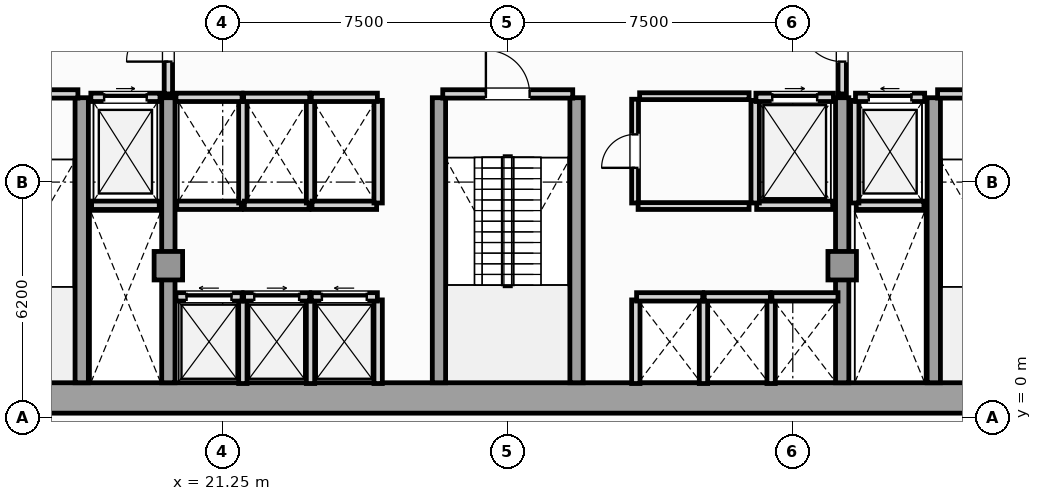
"""IFC4 building model, lengths in metres.
Left out: names, types, materials, properties, quantities, classifications, styles, units other than length and angle.
Written with IfcOpenShell. Run it as: python <this file> out.ifc"""

import sys

from ifc_helpers import new_model, si_unit, direction, frame, frame_2d, origin, origin_2d, place, context, subcontext, project, spatial, rectangle, extrude, element, fill, save


model = new_model("IFC4")
c1 = context("Model", 3, precision=1e-05, world=origin(), true_north=direction((0.0, 1.0)))
c2 = subcontext(c1, "Body", "Model", "MODEL_VIEW")
j1 = project(units=[si_unit("LENGTHUNIT", "METRE"), si_unit("PLANEANGLEUNIT", "RADIAN")], contexts=[c1])
p1 = place(None, origin())
s1 = spatial("IfcSite", under=j1, at=p1, CompositionType="ELEMENT")
p2 = place(p1, origin())
s2 = spatial("IfcBuilding", under=s1, at=p2, CompositionType="ELEMENT")
p3 = place(p2, frame((0.0, 0.0, 19.8)))
s3 = spatial("IfcBuildingStorey", under=s2, at=p3, CompositionType="ELEMENT", Elevation=19.8)
p4 = place(p3, frame((13.25, 0.52, 0.0), z_axis=(0.0, 0.0, 1.0), x_axis=(1.0, 0.0, 0.0)))
e1 = element("IfcWall", 1, at=p4, inside=s3, PredefinedType="SHEAR", context=c2, shape_type="SweptSolid", body=[
    extrude(rectangle(XDim=31.0, YDim=0.8, at=frame_2d((15.5, 0.0))), origin(), (0.0, 0.0, 1.0), 4.4),
])
for number, where, z_axis, x_axis in (
    (2, (17.54, 0.92, 0.0), (0.0, 0.0, 1.0), (0.0, 1.0, 0.0)),
    (3, (19.82, 0.92, 0.0), (0.0, 0.0, 1.0), (0.0, 1.0, 0.0)),
    (4, (26.94, 0.92, 0.0), (0.0, 0.0, 1.0), (0.0, 1.0, 0.0)),
    (5, (30.56, 0.92, 0.0), (0.0, 0.0, 1.0), (0.0, 1.0, 0.0)),
    (6, (37.55, 0.92, 0.0), (0.0, 0.0, 1.0), (0.0, 1.0, 0.0)),
    (7, (39.96, 0.92, 0.0), (0.0, 0.0, 1.0), (0.0, 1.0, 0.0)),
):
    element("IfcWall", number, at=place(p3, frame(where, z_axis=z_axis, x_axis=x_axis)), inside=s3, PredefinedType="SHEAR", context=c2, shape_type="SweptSolid", body=[
        extrude(rectangle(XDim=7.5, YDim=0.35, at=frame_2d((3.75, 0.0))), origin(), (0.0, 0.0, 1.0), 4.4),
    ])
for number, where, z_axis, x_axis in (
    (8, (19.82, 4.0, 0.0), (0.0, 0.0, 1.0), (1.0, 0.0, 0.0)),
    (9, (37.55, 4.0, 0.0), (0.0, 0.0, 1.0), (1.0, 0.0, 0.0)),
):
    element("IfcColumn", number, at=place(p3, frame(where, z_axis=z_axis, x_axis=x_axis)), inside=s3, PredefinedType="COLUMN", context=c2, shape_type="SweptSolid", body=[
        extrude(rectangle(XDim=0.75, YDim=0.75, at=origin_2d()), origin(), (0.0, 0.0, 1.0), 4.8),
    ])
p5 = place(p3, frame((17.8, 5.59, 0.0), z_axis=(0.0, 0.0, 1.0), x_axis=(1.0, 0.0, 0.0)))
e10 = element("IfcWall", 10, at=p5, inside=s3, PredefinedType="SOLIDWALL", context=c2, shape_type="SweptSolid", body=[
    extrude(rectangle(XDim=1.78, YDim=0.22, at=frame_2d((0.89, 0.0))), origin(), (0.0, 0.0, 1.0), 4.4),
])
p6 = place(p3, frame((17.78, 8.43, 0.0), z_axis=(0.0, 0.0, 1.0), x_axis=(1.0, 0.0, 0.0)))
e11 = element("IfcWall", 11, at=p6, inside=s3, PredefinedType="SOLIDWALL", context=c2, shape_type="SweptSolid", body=[
    extrude(rectangle(XDim=1.82, YDim=0.22, at=frame_2d((0.91, 0.0))), origin(), (0.0, 0.0, 1.0), 4.4),
])
p7 = place(p6, frame((0.35, 0.0, 0.0)))
e12 = element("IfcOpeningElement", 12, at=p7, cuts=e11, PredefinedType="OPENING", context=c2, shape_type="SweptSolid", body=[
    extrude(rectangle(XDim=1.12, YDim=2.25, at=frame_2d((0.56, 1.125))), frame((0.0, 0.12, 0.0), z_axis=(0.0, -1.0, 0.0), x_axis=(1.0, 0.0, 0.0)), (0.0, 0.0, 1.0), 0.24),
])
p8 = place(p3, frame((37.92, 5.59, 0.0), z_axis=(0.0, 0.0, 1.0), x_axis=(1.0, 0.0, 0.0)))
e13 = element("IfcWall", 13, at=p8, inside=s3, PredefinedType="SOLIDWALL", context=c2, shape_type="SweptSolid", body=[
    extrude(rectangle(XDim=1.78, YDim=0.22, at=frame_2d((0.89, 0.0))), origin(), (0.0, 0.0, 1.0), 4.4),
])
p9 = place(p3, frame((37.88, 5.65, 0.0), z_axis=(0.0, 0.0, 1.0), x_axis=(0.0, 1.0, 0.0)))
e14 = element("IfcWall", 14, at=p9, inside=s3, PredefinedType="SOLIDWALL", context=c2, shape_type="SweptSolid", body=[
    extrude(rectangle(XDim=2.7, YDim=0.22, at=frame_2d((1.35, 0.0))), origin(), (0.0, 0.0, 1.0), 4.4),
])
p10 = place(p3, frame((37.9, 8.43, 0.0), z_axis=(0.0, 0.0, 1.0), x_axis=(1.0, 0.0, 0.0)))
e15 = element("IfcWall", 15, at=p10, inside=s3, PredefinedType="SOLIDWALL", context=c2, shape_type="SweptSolid", body=[
    extrude(rectangle(XDim=1.82, YDim=0.22, at=frame_2d((0.91, 0.0))), origin(), (0.0, 0.0, 1.0), 4.4),
])
p11 = place(p10, frame((0.35, 0.0, 0.0)))
e16 = element("IfcOpeningElement", 16, at=p11, cuts=e15, PredefinedType="OPENING", context=c2, shape_type="SweptSolid", body=[
    extrude(rectangle(XDim=1.12, YDim=2.25, at=frame_2d((0.56, 1.125))), frame((0.0, 0.12, 0.0), z_axis=(0.0, -1.0, 0.0), x_axis=(1.0, 0.0, 0.0)), (0.0, 0.0, 1.0), 0.24),
])
p12 = place(p3, frame((35.3, 5.59, 0.0), z_axis=(0.0, 0.0, 1.0), x_axis=(1.0, 0.0, 0.0)))
e17 = element("IfcWall", 17, at=p12, inside=s3, PredefinedType="SOLIDWALL", context=c2, shape_type="SweptSolid", body=[
    extrude(rectangle(XDim=2.0, YDim=0.22, at=frame_2d((1.0, 0.0))), origin(), (0.0, 0.0, 1.0), 4.4),
])
p13 = place(p3, frame((35.26, 5.65, 0.0), z_axis=(0.0, 0.0, 1.0), x_axis=(0.0, 1.0, 0.0)))
e18 = element("IfcWall", 18, at=p13, inside=s3, PredefinedType="SOLIDWALL", context=c2, shape_type="SweptSolid", body=[
    extrude(rectangle(XDim=2.7, YDim=0.22, at=frame_2d((1.35, 0.0))), origin(), (0.0, 0.0, 1.0), 4.4),
])
p14 = place(p3, frame((35.28, 8.43, 0.0), z_axis=(0.0, 0.0, 1.0), x_axis=(1.0, 0.0, 0.0)))
e19 = element("IfcWall", 19, at=p14, inside=s3, PredefinedType="SOLIDWALL", context=c2, shape_type="SweptSolid", body=[
    extrude(rectangle(XDim=2.04, YDim=0.22, at=frame_2d((1.02, 0.0))), origin(), (0.0, 0.0, 1.0), 4.4),
])
p15 = place(p14, frame((0.43, 0.0, 0.0)))
e20 = element("IfcOpeningElement", 20, at=p15, cuts=e19, PredefinedType="OPENING", context=c2, shape_type="SweptSolid", body=[
    extrude(rectangle(XDim=1.18, YDim=2.2, at=frame_2d((0.59, 1.1))), frame((0.0, 0.12, 0.0), z_axis=(0.0, -1.0, 0.0), x_axis=(1.0, 0.0, 0.0)), (0.0, 0.0, 1.0), 0.24),
])
p16 = place(p3, frame((21.78, 0.9, 0.0), z_axis=(0.0, 0.0, 1.0), x_axis=(0.0, 1.0, 0.0)))
e21 = element("IfcWall", 21, at=p16, inside=s3, PredefinedType="SOLIDWALL", context=c2, shape_type="SweptSolid", body=[
    extrude(rectangle(XDim=2.2, YDim=0.22, at=frame_2d((1.1, 0.0))), origin(), (0.0, 0.0, 1.0), 4.4),
])
p17 = place(p3, frame((20.02, 3.18, 0.0), z_axis=(0.0, 0.0, 1.0), x_axis=(1.0, 0.0, 0.0)))
e22 = element("IfcWall", 22, at=p17, inside=s3, PredefinedType="SOLIDWALL", context=c2, shape_type="SweptSolid", body=[
    extrude(rectangle(XDim=1.74, YDim=0.22, at=frame_2d((0.87, 0.0))), origin(), (0.0, 0.0, 1.0), 4.4),
])
p18 = place(p17, frame((0.28, 0.0, 0.0)))
e23 = element("IfcOpeningElement", 23, at=p18, cuts=e22, PredefinedType="OPENING", context=c2, shape_type="SweptSolid", body=[
    extrude(rectangle(XDim=1.18, YDim=2.2, at=frame_2d((0.59, 1.1))), frame((0.0, 0.12, 0.0), z_axis=(0.0, -1.0, 0.0), x_axis=(1.0, 0.0, 0.0)), (0.0, 0.0, 1.0), 0.24),
])
p19 = place(p3, frame((23.56, 0.9, 0.0), z_axis=(0.0, 0.0, 1.0), x_axis=(0.0, 1.0, 0.0)))
e24 = element("IfcWall", 24, at=p19, inside=s3, PredefinedType="SOLIDWALL", context=c2, shape_type="SweptSolid", body=[
    extrude(rectangle(XDim=2.2, YDim=0.22, at=frame_2d((1.1, 0.0))), origin(), (0.0, 0.0, 1.0), 4.4),
])
p20 = place(p3, frame((21.8, 3.18, 0.0), z_axis=(0.0, 0.0, 1.0), x_axis=(1.0, 0.0, 0.0)))
e25 = element("IfcWall", 25, at=p20, inside=s3, PredefinedType="SOLIDWALL", context=c2, shape_type="SweptSolid", body=[
    extrude(rectangle(XDim=1.74, YDim=0.22, at=frame_2d((0.87, 0.0))), origin(), (0.0, 0.0, 1.0), 4.4),
])
p21 = place(p20, frame((0.28, 0.0, 0.0)))
e26 = element("IfcOpeningElement", 26, at=p21, cuts=e25, PredefinedType="OPENING", context=c2, shape_type="SweptSolid", body=[
    extrude(rectangle(XDim=1.18, YDim=2.2, at=frame_2d((0.59, 1.1))), frame((0.0, 0.12, 0.0), z_axis=(0.0, -1.0, 0.0), x_axis=(1.0, 0.0, 0.0)), (0.0, 0.0, 1.0), 0.24),
])
p22 = place(p3, frame((25.34, 0.9, 0.0), z_axis=(0.0, 0.0, 1.0), x_axis=(0.0, 1.0, 0.0)))
e27 = element("IfcWall", 27, at=p22, inside=s3, PredefinedType="SOLIDWALL", context=c2, shape_type="SweptSolid", body=[
    extrude(rectangle(XDim=2.2, YDim=0.22, at=frame_2d((1.1, 0.0))), origin(), (0.0, 0.0, 1.0), 4.4),
])
p23 = place(p3, frame((23.58, 3.18, 0.0), z_axis=(0.0, 0.0, 1.0), x_axis=(1.0, 0.0, 0.0)))
e28 = element("IfcWall", 28, at=p23, inside=s3, PredefinedType="SOLIDWALL", context=c2, shape_type="SweptSolid", body=[
    extrude(rectangle(XDim=1.74, YDim=0.22, at=frame_2d((0.87, 0.0))), origin(), (0.0, 0.0, 1.0), 4.4),
])
p24 = place(p23, frame((0.28, 0.0, 0.0)))
e29 = element("IfcOpeningElement", 29, at=p24, cuts=e28, PredefinedType="OPENING", context=c2, shape_type="SweptSolid", body=[
    extrude(rectangle(XDim=1.18, YDim=2.2, at=frame_2d((0.59, 1.1))), frame((0.0, 0.12, 0.0), z_axis=(0.0, -1.0, 0.0), x_axis=(1.0, 0.0, 0.0)), (0.0, 0.0, 1.0), 0.24),
])
for number, where, z_axis, x_axis in (
    (30, (32.12, 0.9, 0.0), (0.0, 0.0, 1.0), (0.0, 1.0, 0.0)),
    (31, (33.9, 0.9, 0.0), (0.0, 0.0, 1.0), (0.0, 1.0, 0.0)),
):
    element("IfcWall", number, at=place(p3, frame(where, z_axis=z_axis, x_axis=x_axis)), inside=s3, PredefinedType="SOLIDWALL", context=c2, shape_type="SweptSolid", body=[
        extrude(rectangle(XDim=2.2, YDim=0.22, at=frame_2d((1.1, 0.0))), origin(), (0.0, 0.0, 1.0), 4.4),
    ])
p25 = place(p3, frame((32.14, 3.18, 0.0), z_axis=(0.0, 0.0, 1.0), x_axis=(1.0, 0.0, 0.0)))
e32 = element("IfcWall", 32, at=p25, inside=s3, PredefinedType="SOLIDWALL", context=c2, shape_type="SweptSolid", body=[
    extrude(rectangle(XDim=1.74, YDim=0.22, at=frame_2d((0.87, 0.0))), origin(), (0.0, 0.0, 1.0), 4.4),
])
p26 = place(p3, frame((35.68, 0.9, 0.0), z_axis=(0.0, 0.0, 1.0), x_axis=(0.0, 1.0, 0.0)))
e33 = element("IfcWall", 33, at=p26, inside=s3, PredefinedType="SOLIDWALL", context=c2, shape_type="SweptSolid", body=[
    extrude(rectangle(XDim=2.2, YDim=0.22, at=frame_2d((1.1, 0.0))), origin(), (0.0, 0.0, 1.0), 4.4),
])
for number, where, z_axis, x_axis in (
    (34, (33.92, 3.18, 0.0), (0.0, 0.0, 1.0), (1.0, 0.0, 0.0)),
    (35, (35.7, 3.18, 0.0), (0.0, 0.0, 1.0), (1.0, 0.0, 0.0)),
):
    element("IfcWall", number, at=place(p3, frame(where, z_axis=z_axis, x_axis=x_axis)), inside=s3, PredefinedType="SOLIDWALL", context=c2, shape_type="SweptSolid", body=[
        extrude(rectangle(XDim=1.74, YDim=0.22, at=frame_2d((0.87, 0.0))), origin(), (0.0, 0.0, 1.0), 4.4),
    ])
p27 = place(p3, frame((20.04, 5.59, 0.0), z_axis=(0.0, 0.0, 1.0), x_axis=(1.0, 0.0, 0.0)))
e36 = element("IfcWall", 36, at=p27, inside=s3, PredefinedType="SOLIDWALL", context=c2, shape_type="SweptSolid", body=[
    extrude(rectangle(XDim=1.7, YDim=0.22, at=frame_2d((0.85, 0.0))), origin(), (0.0, 0.0, 1.0), 4.4),
])
p28 = place(p3, frame((21.78, 5.65, 0.0), z_axis=(0.0, 0.0, 1.0), x_axis=(0.0, 1.0, 0.0)))
e37 = element("IfcWall", 37, at=p28, inside=s3, PredefinedType="SOLIDWALL", context=c2, shape_type="SweptSolid", body=[
    extrude(rectangle(XDim=2.7, YDim=0.22, at=frame_2d((1.35, 0.0))), origin(), (0.0, 0.0, 1.0), 4.4),
])
p29 = place(p3, frame((20.02, 8.43, 0.0), z_axis=(0.0, 0.0, 1.0), x_axis=(1.0, 0.0, 0.0)))
e38 = element("IfcWall", 38, at=p29, inside=s3, PredefinedType="SOLIDWALL", context=c2, shape_type="SweptSolid", body=[
    extrude(rectangle(XDim=1.74, YDim=0.22, at=frame_2d((0.87, 0.0))), origin(), (0.0, 0.0, 1.0), 4.4),
])
p30 = place(p3, frame((21.82, 5.59, 0.0), z_axis=(0.0, 0.0, 1.0), x_axis=(1.0, 0.0, 0.0)))
e39 = element("IfcWall", 39, at=p30, inside=s3, PredefinedType="SOLIDWALL", context=c2, shape_type="SweptSolid", body=[
    extrude(rectangle(XDim=1.7, YDim=0.22, at=frame_2d((0.85, 0.0))), origin(), (0.0, 0.0, 1.0), 4.4),
])
p31 = place(p3, frame((23.56, 5.65, 0.0), z_axis=(0.0, 0.0, 1.0), x_axis=(0.0, 1.0, 0.0)))
e40 = element("IfcWall", 40, at=p31, inside=s3, PredefinedType="SOLIDWALL", context=c2, shape_type="SweptSolid", body=[
    extrude(rectangle(XDim=2.7, YDim=0.22, at=frame_2d((1.35, 0.0))), origin(), (0.0, 0.0, 1.0), 4.4),
])
p32 = place(p3, frame((21.8, 8.43, 0.0), z_axis=(0.0, 0.0, 1.0), x_axis=(1.0, 0.0, 0.0)))
e41 = element("IfcWall", 41, at=p32, inside=s3, PredefinedType="SOLIDWALL", context=c2, shape_type="SweptSolid", body=[
    extrude(rectangle(XDim=1.74, YDim=0.22, at=frame_2d((0.87, 0.0))), origin(), (0.0, 0.0, 1.0), 4.4),
])
p33 = place(p3, frame((23.6, 5.59, 0.0), z_axis=(0.0, 0.0, 1.0), x_axis=(1.0, 0.0, 0.0)))
e42 = element("IfcWall", 42, at=p33, inside=s3, PredefinedType="SOLIDWALL", context=c2, shape_type="SweptSolid", body=[
    extrude(rectangle(XDim=1.7, YDim=0.22, at=frame_2d((0.85, 0.0))), origin(), (0.0, 0.0, 1.0), 4.4),
])
p34 = place(p3, frame((25.34, 5.65, 0.0), z_axis=(0.0, 0.0, 1.0), x_axis=(0.0, 1.0, 0.0)))
e43 = element("IfcWall", 43, at=p34, inside=s3, PredefinedType="SOLIDWALL", context=c2, shape_type="SweptSolid", body=[
    extrude(rectangle(XDim=2.7, YDim=0.22, at=frame_2d((1.35, 0.0))), origin(), (0.0, 0.0, 1.0), 4.4),
])
p35 = place(p3, frame((23.58, 8.43, 0.0), z_axis=(0.0, 0.0, 1.0), x_axis=(1.0, 0.0, 0.0)))
e44 = element("IfcWall", 44, at=p35, inside=s3, PredefinedType="SOLIDWALL", context=c2, shape_type="SweptSolid", body=[
    extrude(rectangle(XDim=1.74, YDim=0.22, at=frame_2d((0.87, 0.0))), origin(), (0.0, 0.0, 1.0), 4.4),
])
p36 = place(p3, frame((14.04, 8.52, 0.0), z_axis=(0.0, 0.0, 1.0), x_axis=(1.0, 0.0, 0.0)))
e45 = element("IfcWall", 45, at=p36, inside=s3, PredefinedType="SOLIDWALL", context=c2, shape_type="SweptSolid", body=[
    extrude(rectangle(XDim=3.4, YDim=0.22, at=frame_2d((1.7, 0.0))), origin(), (0.0, 0.0, 1.0), 4.4),
])
p37 = place(p36, frame((1.125, 0.0, 0.0)))
e46 = element("IfcOpeningElement", 46, at=p37, cuts=e45, PredefinedType="OPENING", context=c2, shape_type="SweptSolid", body=[
    extrude(rectangle(XDim=1.15, YDim=2.2, at=frame_2d((0.575, 1.1))), frame((0.0, 0.12, 0.0), z_axis=(0.0, -1.0, 0.0), x_axis=(1.0, 0.0, 0.0)), (0.0, 0.0, 1.0), 0.24),
])
p38 = place(p3, frame((40.06, 8.52, 0.0), z_axis=(0.0, 0.0, 1.0), x_axis=(1.0, 0.0, 0.0)))
e47 = element("IfcWall", 47, at=p38, inside=s3, PredefinedType="SOLIDWALL", context=c2, shape_type="SweptSolid", body=[
    extrude(rectangle(XDim=3.4, YDim=0.22, at=frame_2d((1.7, 0.0))), origin(), (0.0, 0.0, 1.0), 4.4),
])
p39 = place(p38, frame((1.125, 0.0, 0.0)))
e48 = element("IfcOpeningElement", 48, at=p39, cuts=e47, PredefinedType="OPENING", context=c2, shape_type="SweptSolid", body=[
    extrude(rectangle(XDim=1.15, YDim=2.2, at=frame_2d((0.575, 1.1))), frame((0.0, 0.12, 0.0), z_axis=(0.0, -1.0, 0.0), x_axis=(1.0, 0.0, 0.0)), (0.0, 0.0, 1.0), 0.24),
])
p40 = place(p3, frame((27.04, 8.52, 0.0), z_axis=(0.0, 0.0, 1.0), x_axis=(1.0, 0.0, 0.0)))
e49 = element("IfcWall", 49, at=p40, inside=s3, PredefinedType="SOLIDWALL", context=c2, shape_type="SweptSolid", body=[
    extrude(rectangle(XDim=3.42, YDim=0.22, at=frame_2d((1.71, 0.0))), origin(), (0.0, 0.0, 1.0), 4.4),
])
p41 = place(p40, frame((1.135, 0.0, 0.0)))
e50 = element("IfcOpeningElement", 50, at=p41, cuts=e49, PredefinedType="OPENING", context=c2, shape_type="SweptSolid", body=[
    extrude(rectangle(XDim=1.15, YDim=2.2, at=frame_2d((0.575, 1.1))), frame((0.0, 0.12, 0.0), z_axis=(0.0, -1.0, 0.0), x_axis=(1.0, 0.0, 0.0)), (0.0, 0.0, 1.0), 0.24),
])
p42 = place(p3, frame((19.82, 8.52, 0.0), z_axis=(0.0, 0.0, 1.0), x_axis=(0.0, 1.0, 0.0)))
e51 = element("IfcWall", 51, at=p42, inside=s3, PredefinedType="SOLIDWALL", context=c2, shape_type="SweptSolid", body=[
    extrude(rectangle(XDim=2.8, YDim=0.22, at=frame_2d((1.4, 0.0))), origin(), (0.0, 0.0, 1.0), 3.855),
])
p43 = place(p42, frame((0.85, 0.0, 0.0)))
e52 = element("IfcOpeningElement", 52, at=p43, cuts=e51, PredefinedType="OPENING", context=c2, shape_type="SweptSolid", body=[
    extrude(rectangle(XDim=1.1, YDim=2.2, at=frame_2d((0.55, 1.1))), frame((0.0, 0.12, 0.0), z_axis=(0.0, -1.0, 0.0), x_axis=(1.0, 0.0, 0.0)), (0.0, 0.0, 1.0), 0.24),
])
p44 = place(p3, frame((37.55, 8.52, 0.0), z_axis=(0.0, 0.0, 1.0), x_axis=(0.0, 1.0, 0.0)))
e53 = element("IfcWall", 53, at=p44, inside=s3, PredefinedType="SOLIDWALL", context=c2, shape_type="SweptSolid", body=[
    extrude(rectangle(XDim=2.8, YDim=0.22, at=frame_2d((1.4, 0.0))), origin(), (0.0, 0.0, 1.0), 3.855),
])
p45 = place(p44, frame((0.85, 0.0, 0.0)))
e54 = element("IfcOpeningElement", 54, at=p45, cuts=e53, PredefinedType="OPENING", context=c2, shape_type="SweptSolid", body=[
    extrude(rectangle(XDim=1.1, YDim=2.2, at=frame_2d((0.55, 1.1))), frame((0.0, 0.12, 0.0), z_axis=(0.0, -1.0, 0.0), x_axis=(1.0, 0.0, 0.0)), (0.0, 0.0, 1.0), 0.24),
])
p46 = place(p3, frame((32.1, 5.65, 0.0), z_axis=(0.0, 0.0, 1.0), x_axis=(0.0, 1.0, 0.0)))
e55 = element("IfcWall", 55, at=p46, inside=s3, PredefinedType="PARTITIONING", context=c2, shape_type="SweptSolid", body=[
    extrude(rectangle(XDim=2.73, YDim=0.18, at=frame_2d((1.365, 0.0))), origin(), (0.0, 0.0, 1.0), 4.4),
])
p47 = place(p46, frame((0.925, 0.0, 0.0)))
e56 = element("IfcOpeningElement", 56, at=p47, cuts=e55, PredefinedType="OPENING", context=c2, shape_type="SweptSolid", body=[
    extrude(rectangle(XDim=0.88, YDim=2.05, at=frame_2d((0.44, 1.025))), frame((0.0, 0.1, 0.0), z_axis=(0.0, -1.0, 0.0), x_axis=(1.0, 0.0, 0.0)), (0.0, 0.0, 1.0), 0.2),
])
p48 = place(p3, frame((32.22, 8.46, 0.0), z_axis=(0.0, 0.0, 1.0), x_axis=(1.0, 0.0, 0.0)))
e57 = element("IfcWall", 57, at=p48, inside=s3, PredefinedType="PARTITIONING", context=c2, shape_type="SweptSolid", body=[
    extrude(rectangle(XDim=2.88, YDim=0.18, at=frame_2d((1.44, 0.0))), origin(), (0.0, 0.0, 1.0), 4.4),
])
p49 = place(p3, frame((32.18, 5.57, 0.0), z_axis=(0.0, 0.0, 1.0), x_axis=(1.0, 0.0, 0.0)))
e58 = element("IfcWall", 58, at=p49, inside=s3, PredefinedType="PARTITIONING", context=c2, shape_type="SweptSolid", body=[
    extrude(rectangle(XDim=2.92, YDim=0.18, at=frame_2d((1.46, 0.0))), origin(), (0.0, 0.0, 1.0), 4.4),
])
p50 = place(p7, origin())
e59 = element("IfcDoor", 59, at=p50, inside=s3, OperationType="SLIDING_TO_RIGHT", PredefinedType="DOOR", context=c2, shape_type="SweptSolid", body=[
    extrude(rectangle(XDim=1.12, YDim=2.25, at=frame_2d((0.56, 1.125))), frame((0.0, 0.025, 0.0), z_axis=(0.0, -1.0, 0.0), x_axis=(1.0, 0.0, 0.0)), (0.0, 0.0, 1.0), 0.05),
])
fill(e12, e59)
p51 = place(p11, origin())
e60 = element("IfcDoor", 60, at=p51, inside=s3, OperationType="SLIDING_TO_LEFT", PredefinedType="DOOR", context=c2, shape_type="SweptSolid", body=[
    extrude(rectangle(XDim=1.12, YDim=2.25, at=frame_2d((0.56, 1.125))), frame((0.0, 0.025, 0.0), z_axis=(0.0, -1.0, 0.0), x_axis=(1.0, 0.0, 0.0)), (0.0, 0.0, 1.0), 0.05),
])
fill(e16, e60)
p52 = place(p15, origin())
e61 = element("IfcDoor", 61, at=p52, inside=s3, OperationType="SLIDING_TO_RIGHT", PredefinedType="DOOR", context=c2, shape_type="SweptSolid", body=[
    extrude(rectangle(XDim=1.18, YDim=2.2, at=frame_2d((0.59, 1.1))), frame((0.0, 0.025, 0.0), z_axis=(0.0, -1.0, 0.0), x_axis=(1.0, 0.0, 0.0)), (0.0, 0.0, 1.0), 0.05),
])
fill(e20, e61)
p53 = place(p18, origin())
e62 = element("IfcDoor", 62, at=p53, inside=s3, OperationType="SLIDING_TO_LEFT", PredefinedType="DOOR", context=c2, shape_type="SweptSolid", body=[
    extrude(rectangle(XDim=1.18, YDim=2.2, at=frame_2d((0.59, 1.1))), frame((0.0, 0.025, 0.0), z_axis=(0.0, -1.0, 0.0), x_axis=(1.0, 0.0, 0.0)), (0.0, 0.0, 1.0), 0.05),
])
fill(e23, e62)
p54 = place(p21, origin())
e63 = element("IfcDoor", 63, at=p54, inside=s3, OperationType="SLIDING_TO_RIGHT", PredefinedType="DOOR", context=c2, shape_type="SweptSolid", body=[
    extrude(rectangle(XDim=1.18, YDim=2.2, at=frame_2d((0.59, 1.1))), frame((0.0, 0.025, 0.0), z_axis=(0.0, -1.0, 0.0), x_axis=(1.0, 0.0, 0.0)), (0.0, 0.0, 1.0), 0.05),
])
fill(e26, e63)
p55 = place(p24, origin())
e64 = element("IfcDoor", 64, at=p55, inside=s3, OperationType="SLIDING_TO_LEFT", PredefinedType="DOOR", context=c2, shape_type="SweptSolid", body=[
    extrude(rectangle(XDim=1.18, YDim=2.2, at=frame_2d((0.59, 1.1))), frame((0.0, 0.025, 0.0), z_axis=(0.0, -1.0, 0.0), x_axis=(1.0, 0.0, 0.0)), (0.0, 0.0, 1.0), 0.05),
])
fill(e29, e64)
p56 = place(p41, origin())
e65 = element("IfcDoor", 65, at=p56, inside=s3, OperationType="SINGLE_SWING_LEFT", PredefinedType="DOOR", context=c2, shape_type="SweptSolid", body=[
    extrude(rectangle(XDim=1.15, YDim=2.2, at=frame_2d((0.575, 1.1))), frame((0.0, 0.025, 0.0), z_axis=(0.0, -1.0, 0.0), x_axis=(1.0, 0.0, 0.0)), (0.0, 0.0, 1.0), 0.05),
])
fill(e50, e65)
p57 = place(p43, origin())
e66 = element("IfcDoor", 66, at=p57, inside=s3, OperationType="SINGLE_SWING_LEFT", PredefinedType="DOOR", context=c2, shape_type="SweptSolid", body=[
    extrude(rectangle(XDim=1.1, YDim=2.2, at=frame_2d((0.55, 1.1))), frame((0.0, 0.025, 0.0), z_axis=(0.0, -1.0, 0.0), x_axis=(1.0, 0.0, 0.0)), (0.0, 0.0, 1.0), 0.05),
])
fill(e52, e66)
p58 = place(p45, origin())
e67 = element("IfcDoor", 67, at=p58, inside=s3, OperationType="SINGLE_SWING_RIGHT", PredefinedType="DOOR", context=c2, shape_type="SweptSolid", body=[
    extrude(rectangle(XDim=1.1, YDim=2.2, at=frame_2d((0.55, 1.1))), frame((0.0, 0.025, 0.0), z_axis=(0.0, -1.0, 0.0), x_axis=(1.0, 0.0, 0.0)), (0.0, 0.0, 1.0), 0.05),
])
fill(e54, e67)
p59 = place(p47, origin())
e68 = element("IfcDoor", 68, at=p59, inside=s3, OperationType="SINGLE_SWING_LEFT", PredefinedType="DOOR", context=c2, shape_type="SweptSolid", body=[
    extrude(rectangle(XDim=0.88, YDim=2.05, at=frame_2d((0.44, 1.025))), frame((0.0, 0.025, 0.0), z_axis=(0.0, -1.0, 0.0), x_axis=(1.0, 0.0, 0.0)), (0.0, 0.0, 1.0), 0.05),
])
fill(e56, e68)
save(model, sys.argv[1])
